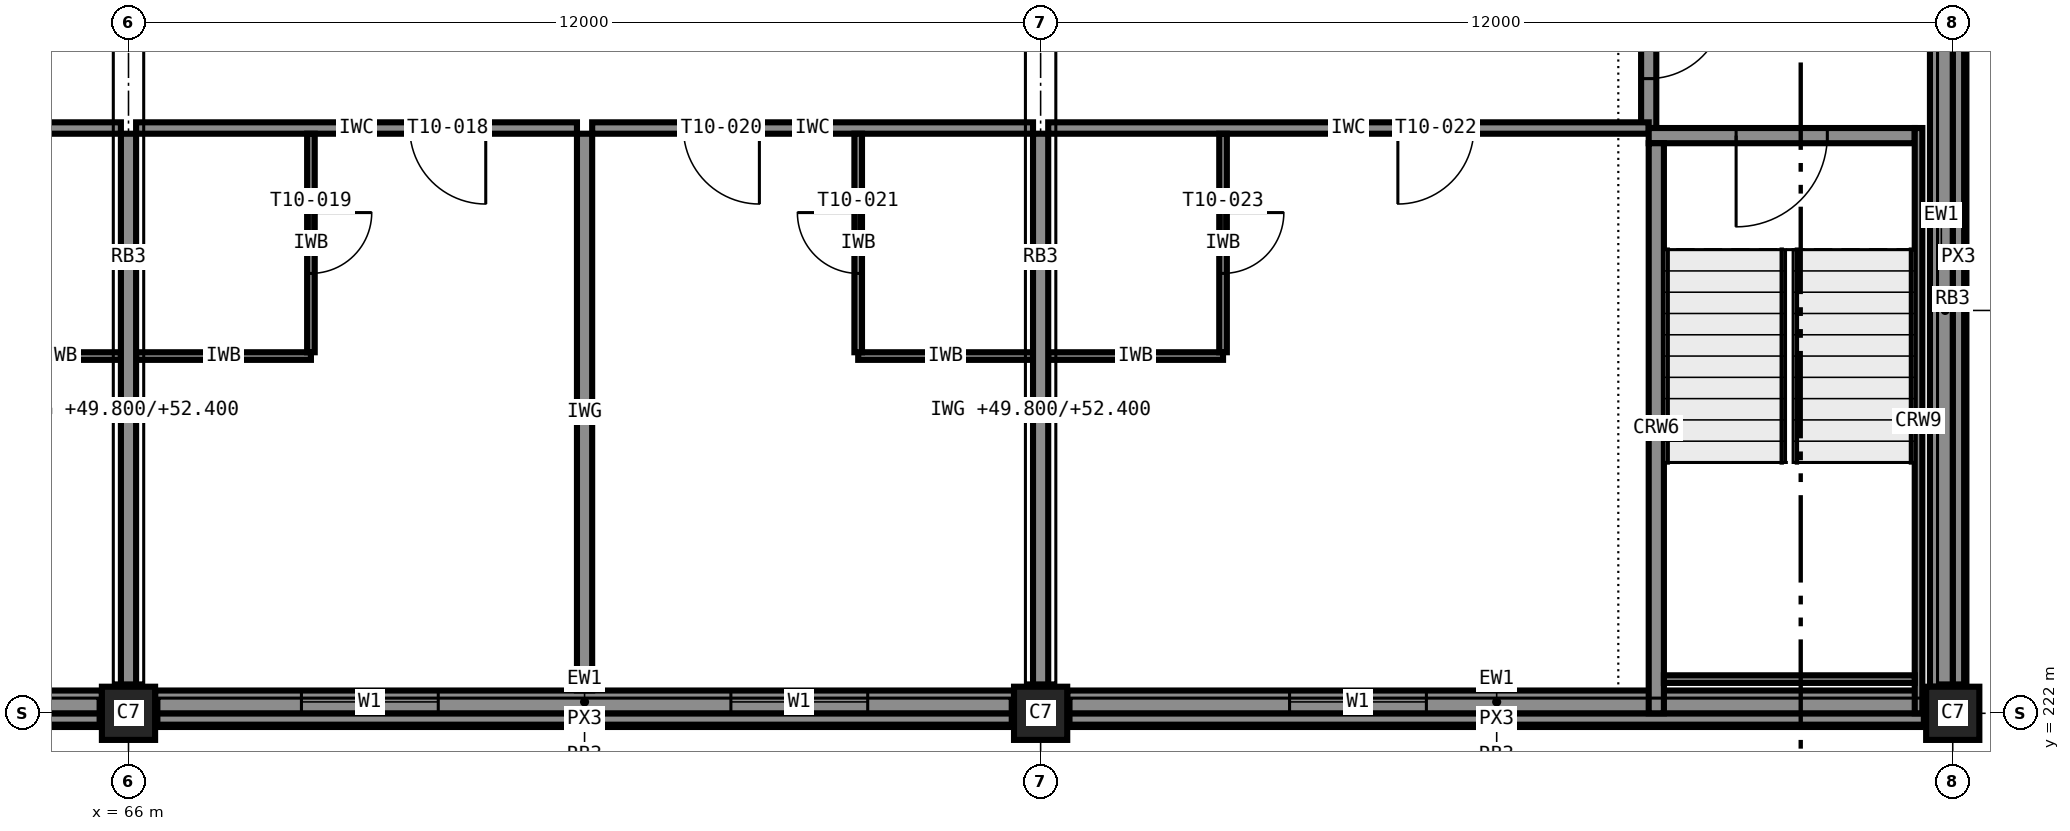
"""IFC4 building model, lengths in metres.
Left out: names, types, materials, properties, quantities, classifications, styles, units other than length and angle.
Written with IfcOpenShell. Run it as: python <this file> out.ifc"""

import sys

from ifc_helpers import new_model, si_unit, direction, frame, frame_2d, origin, origin_2d, place, context, subcontext, project, spatial, rectangle, extrude, element, fill, save


model = new_model("IFC4")
c1 = context("Model", 3, precision=1e-05, world=origin(), true_north=direction((0.0, 1.0)))
c2 = subcontext(c1, "Body", "Model", "MODEL_VIEW")
j1 = project(units=[si_unit("LENGTHUNIT", "METRE"), si_unit("PLANEANGLEUNIT", "RADIAN")], contexts=[c1])
p1 = place(None, origin())
s1 = spatial("IfcSite", under=j1, at=p1, CompositionType="ELEMENT")
p2 = place(p1, origin())
s2 = spatial("IfcBuilding", under=s1, at=p2, CompositionType="ELEMENT")
p3 = place(p2, frame((0.0, 0.0, 49.8)))
s3 = spatial("IfcBuildingStorey", under=s2, at=p3, CompositionType="ELEMENT", Elevation=49.8)
for number, where, z_axis, x_axis in (
    (1, (66.0, 222.0, 0.0), (0.0, 0.0, 1.0), (1.0, 0.0, 0.0)),
    (2, (78.0, 222.0, 0.0), (0.0, 0.0, 1.0), (1.0, 0.0, 0.0)),
    (3, (90.0, 222.0, 0.0), (0.0, 0.0, 1.0), (1.0, 0.0, 0.0)),
):
    element("IfcColumn", number, at=place(p3, frame(where, z_axis=z_axis, x_axis=x_axis)), inside=s3, PredefinedType="COLUMN", context=c2, shape_type="SweptSolid", body=[
        extrude(rectangle(XDim=0.7, YDim=0.7, at=origin_2d()), origin(), (0.0, 0.0, 1.0), 3.6),
    ])
p4 = place(p3, frame((89.5, 229.6, 0.0), z_axis=(0.0, 0.0, 1.0), x_axis=(-1.0, 0.0, 0.0)))
e4 = element("IfcWall", 4, at=p4, inside=s3, PredefinedType="SHEAR", context=c2, shape_type="SweptSolid", body=[
    extrude(rectangle(XDim=3.5, YDim=0.2, at=frame_2d((1.75, 0.0))), origin(), (0.0, 0.0, 1.0), 3.6),
])
p5 = place(p4, frame((1.15, 0.0, 0.0)))
e5 = element("IfcOpeningElement", 5, at=p5, cuts=e4, PredefinedType="OPENING", context=c2, shape_type="SweptSolid", body=[
    extrude(rectangle(XDim=1.2, YDim=2.1, at=frame_2d((0.6, 1.05))), frame((0.0, 0.11, 0.0), z_axis=(0.0, -1.0, 0.0), x_axis=(1.0, 0.0, 0.0)), (0.0, 0.0, 1.0), 0.22),
])
p6 = place(p3, frame((86.1, 222.0, 0.0), z_axis=(0.0, 0.0, 1.0), x_axis=(0.0, 1.0, 0.0)))
e6 = element("IfcWall", 6, at=p6, inside=s3, PredefinedType="SHEAR", context=c2, shape_type="SweptSolid", body=[
    extrude(rectangle(XDim=7.5, YDim=0.2, at=frame_2d((3.75, 0.0))), origin(), (0.0, 0.0, 1.0), 3.6),
])
p7 = place(p3, frame((89.55, 229.7, 0.0), z_axis=(0.0, 0.0, 1.0), x_axis=(0.0, -1.0, 0.0)))
e7 = element("IfcWall", 7, at=p7, inside=s3, PredefinedType="SHEAR", context=c2, shape_type="SweptSolid", body=[
    extrude(rectangle(XDim=7.7, YDim=0.1, at=frame_2d((3.85, 0.0))), origin(), (0.0, 0.0, 1.0), 3.4),
])
p8 = place(p3, frame((89.5, 222.45, 0.0), z_axis=(0.0, 0.0, 1.0), x_axis=(-1.0, 0.0, 0.0)))
e8 = element("IfcWall", 8, at=p8, inside=s3, PredefinedType="SHEAR", context=c2, shape_type="SweptSolid", body=[
    extrude(rectangle(XDim=3.3, YDim=0.1, at=frame_2d((1.65, 0.0))), origin(), (0.0, 0.0, 1.0), 3.4),
])
p9 = place(p3, frame((54.35, 222.15, 0.0), z_axis=(0.0, 0.0, 1.0), x_axis=(1.0, 0.0, 0.0)))
e9 = element("IfcWall", 9, at=p9, inside=s3, PredefinedType="STANDARD", context=c2, shape_type="SweptSolid", body=[
    extrude(rectangle(XDim=11.3, YDim=0.3, at=frame_2d((5.65, 0.0))), origin(), (0.0, 0.0, 1.0), 2.6),
])
p10 = place(p9, frame((0.925, 0.0, 0.85)))
e10 = element("IfcOpeningElement", 10, at=p10, cuts=e9, PredefinedType="OPENING", context=c2, shape_type="SweptSolid", body=[
    extrude(rectangle(XDim=1.8, YDim=1.75, at=frame_2d((0.9, 0.875))), frame((0.0, 0.16, 0.0), z_axis=(0.0, -1.0, 0.0), x_axis=(1.0, 0.0, 0.0)), (0.0, 0.0, 1.0), 0.32),
])
p11 = place(p9, frame((4.75, 0.0, 0.85)))
e11 = element("IfcOpeningElement", 11, at=p11, cuts=e9, PredefinedType="OPENING", context=c2, shape_type="SweptSolid", body=[
    extrude(rectangle(XDim=1.8, YDim=1.75, at=frame_2d((0.9, 0.875))), frame((0.0, 0.16, 0.0), z_axis=(0.0, -1.0, 0.0), x_axis=(1.0, 0.0, 0.0)), (0.0, 0.0, 1.0), 0.32),
])
p12 = place(p9, frame((8.575, 0.0, 0.85)))
e12 = element("IfcOpeningElement", 12, at=p12, cuts=e9, PredefinedType="OPENING", context=c2, shape_type="SweptSolid", body=[
    extrude(rectangle(XDim=1.8, YDim=1.75, at=frame_2d((0.9, 0.875))), frame((0.0, 0.16, 0.0), z_axis=(0.0, -1.0, 0.0), x_axis=(1.0, 0.0, 0.0)), (0.0, 0.0, 1.0), 0.32),
])
p13 = place(p3, frame((66.35, 222.15, 0.0), z_axis=(0.0, 0.0, 1.0), x_axis=(1.0, 0.0, 0.0)))
e13 = element("IfcWall", 13, at=p13, inside=s3, PredefinedType="STANDARD", context=c2, shape_type="SweptSolid", body=[
    extrude(rectangle(XDim=11.3, YDim=0.3, at=frame_2d((5.65, 0.0))), origin(), (0.0, 0.0, 1.0), 2.6),
])
p14 = place(p13, frame((1.925, 0.0, 0.85)))
e14 = element("IfcOpeningElement", 14, at=p14, cuts=e13, PredefinedType="OPENING", context=c2, shape_type="SweptSolid", body=[
    extrude(rectangle(XDim=1.8, YDim=1.75, at=frame_2d((0.9, 0.875))), frame((0.0, 0.16, 0.0), z_axis=(0.0, -1.0, 0.0), x_axis=(1.0, 0.0, 0.0)), (0.0, 0.0, 1.0), 0.32),
])
p15 = place(p13, frame((7.575, 0.0, 0.85)))
e15 = element("IfcOpeningElement", 15, at=p15, cuts=e13, PredefinedType="OPENING", context=c2, shape_type="SweptSolid", body=[
    extrude(rectangle(XDim=1.8, YDim=1.75, at=frame_2d((0.9, 0.875))), frame((0.0, 0.16, 0.0), z_axis=(0.0, -1.0, 0.0), x_axis=(1.0, 0.0, 0.0)), (0.0, 0.0, 1.0), 0.32),
])
p16 = place(p3, frame((78.35, 222.15, 0.0), z_axis=(0.0, 0.0, 1.0), x_axis=(1.0, 0.0, 0.0)))
e16 = element("IfcWall", 16, at=p16, inside=s3, PredefinedType="STANDARD", context=c2, shape_type="SweptSolid", body=[
    extrude(rectangle(XDim=11.3, YDim=0.3, at=frame_2d((5.65, 0.0))), origin(), (0.0, 0.0, 1.0), 2.6),
])
p17 = place(p16, frame((2.925, 0.0, 0.85)))
e17 = element("IfcOpeningElement", 17, at=p17, cuts=e16, PredefinedType="OPENING", context=c2, shape_type="SweptSolid", body=[
    extrude(rectangle(XDim=1.8, YDim=1.75, at=frame_2d((0.9, 0.875))), frame((0.0, 0.16, 0.0), z_axis=(0.0, -1.0, 0.0), x_axis=(1.0, 0.0, 0.0)), (0.0, 0.0, 1.0), 0.32),
])
for number, where, z_axis, x_axis in (
    (18, (54.35, 221.925, 3.4), (0.0, 0.0, 1.0), (1.0, 0.0, 0.0)),
    (19, (66.35, 221.925, 3.4), (0.0, 0.0, 1.0), (1.0, 0.0, 0.0)),
    (20, (78.35, 221.925, 3.4), (0.0, 0.0, 1.0), (1.0, 0.0, 0.0)),
):
    element("IfcWall", number, at=place(p3, frame(where, z_axis=z_axis, x_axis=x_axis)), inside=s3, PredefinedType="STANDARD", context=c2, shape_type="SweptSolid", body=[
        extrude(rectangle(XDim=11.3, YDim=0.15, at=frame_2d((5.65, 0.0))), origin(), (0.0, 0.0, 1.0), 0.2),
    ])
p18 = place(p3, frame((89.85, 222.35, 0.0), z_axis=(0.0, 0.0, 1.0), x_axis=(0.0, 1.0, 0.0)))
e21 = element("IfcWall", 21, at=p18, inside=s3, PredefinedType="STANDARD", context=c2, shape_type="SweptSolid", body=[
    extrude(rectangle(XDim=11.3, YDim=0.3, at=frame_2d((5.65, 0.0))), origin(), (0.0, 0.0, 1.0), 2.6),
])
p19 = place(p3, frame((90.075, 222.35, 3.4), z_axis=(0.0, 0.0, 1.0), x_axis=(0.0, 1.0, 0.0)))
e22 = element("IfcWall", 22, at=p19, inside=s3, PredefinedType="STANDARD", context=c2, shape_type="SweptSolid", body=[
    extrude(rectangle(XDim=11.3, YDim=0.15, at=frame_2d((5.65, 0.0))), origin(), (0.0, 0.0, 1.0), 0.2),
])
p20 = place(p3, frame((86.0, 232.0, 0.0), z_axis=(0.0, 0.0, 1.0), x_axis=(0.0, -1.0, 0.0)))
e23 = element("IfcWall", 23, at=p20, inside=s3, PredefinedType="PARTITIONING", context=c2, shape_type="SweptSolid", body=[
    extrude(rectangle(XDim=2.3, YDim=0.2, at=frame_2d((1.15, 0.0))), origin(), (0.0, 0.0, 1.0), 3.4),
])
p21 = place(p20, frame((0.65, 0.0, 0.0)))
e24 = element("IfcOpeningElement", 24, at=p21, cuts=e23, PredefinedType="OPENING", context=c2, shape_type="SweptSolid", body=[
    extrude(rectangle(XDim=1.0, YDim=2.1, at=frame_2d((0.5, 1.05))), frame((0.0, 0.11, 0.0), z_axis=(0.0, -1.0, 0.0), x_axis=(1.0, 0.0, 0.0)), (0.0, 0.0, 1.0), 0.22),
])
p22 = place(p3, frame((65.9, 229.7, 0.0), z_axis=(0.0, 0.0, 1.0), x_axis=(-1.0, 0.0, 0.0)))
e25 = element("IfcWall", 25, at=p22, inside=s3, PredefinedType="PARTITIONING", context=c2, shape_type="SweptSolid", body=[
    extrude(rectangle(XDim=3.8, YDim=0.15, at=frame_2d((1.9, 0.0))), origin(), (0.0, 0.0, 1.0), 3.4),
])
p23 = place(p22, frame((2.25, 0.0, 0.0)))
e26 = element("IfcOpeningElement", 26, at=p23, cuts=e25, PredefinedType="OPENING", context=c2, shape_type="SweptSolid", body=[
    extrude(rectangle(XDim=1.0, YDim=2.1, at=frame_2d((0.5, 1.05))), frame((0.0, 0.085, 0.0), z_axis=(0.0, -1.0, 0.0), x_axis=(1.0, 0.0, 0.0)), (0.0, 0.0, 1.0), 0.17),
])
p24 = place(p3, frame((64.3, 226.7, 0.0), z_axis=(0.0, 0.0, 1.0), x_axis=(1.0, 0.0, 0.0)))
e27 = element("IfcWall", 27, at=p24, inside=s3, PredefinedType="PARTITIONING", context=c2, shape_type="SweptSolid", body=[
    extrude(rectangle(XDim=1.6, YDim=0.1, at=frame_2d((0.8, 0.0))), origin(), (0.0, 0.0, 1.0), 3.4),
])
p25 = place(p3, frame((71.9, 229.7, 0.0), z_axis=(0.0, 0.0, 1.0), x_axis=(-1.0, 0.0, 0.0)))
e28 = element("IfcWall", 28, at=p25, inside=s3, PredefinedType="PARTITIONING", context=c2, shape_type="SweptSolid", body=[
    extrude(rectangle(XDim=5.8, YDim=0.15, at=frame_2d((2.9, 0.0))), origin(), (0.0, 0.0, 1.0), 3.4),
])
p26 = place(p25, frame((1.2, 0.0, 0.0)))
e29 = element("IfcOpeningElement", 29, at=p26, cuts=e28, PredefinedType="OPENING", context=c2, shape_type="SweptSolid", body=[
    extrude(rectangle(XDim=1.0, YDim=2.1, at=frame_2d((0.5, 1.05))), frame((0.0, 0.085, 0.0), z_axis=(0.0, -1.0, 0.0), x_axis=(1.0, 0.0, 0.0)), (0.0, 0.0, 1.0), 0.17),
])
p27 = place(p3, frame((66.1, 226.7, 0.0), z_axis=(0.0, 0.0, 1.0), x_axis=(1.0, 0.0, 0.0)))
e30 = element("IfcWall", 30, at=p27, inside=s3, PredefinedType="PARTITIONING", context=c2, shape_type="SweptSolid", body=[
    extrude(rectangle(XDim=2.3, YDim=0.1, at=frame_2d((1.15, 0.0))), origin(), (0.0, 0.0, 1.0), 3.4),
])
p28 = place(p3, frame((68.4, 229.625, 0.0), z_axis=(0.0, 0.0, 1.0), x_axis=(0.0, -1.0, 0.0)))
e31 = element("IfcWall", 31, at=p28, inside=s3, PredefinedType="PARTITIONING", context=c2, shape_type="SweptSolid", body=[
    extrude(rectangle(XDim=2.875, YDim=0.1, at=frame_2d((1.438, 0.0))), origin(), (0.0, 0.0, 1.0), 3.4),
])
p29 = place(p28, frame((1.038, 0.0, 0.0)))
e32 = element("IfcOpeningElement", 32, at=p29, cuts=e31, PredefinedType="OPENING", context=c2, shape_type="SweptSolid", body=[
    extrude(rectangle(XDim=0.8, YDim=2.1, at=frame_2d((0.4, 1.05))), frame((0.0, 0.06, 0.0), z_axis=(0.0, -1.0, 0.0), x_axis=(1.0, 0.0, 0.0)), (0.0, 0.0, 1.0), 0.12),
])
p30 = place(p3, frame((77.9, 229.7, 0.0), z_axis=(0.0, 0.0, 1.0), x_axis=(-1.0, 0.0, 0.0)))
e33 = element("IfcWall", 33, at=p30, inside=s3, PredefinedType="PARTITIONING", context=c2, shape_type="SweptSolid", body=[
    extrude(rectangle(XDim=5.8, YDim=0.15, at=frame_2d((2.9, 0.0))), origin(), (0.0, 0.0, 1.0), 3.4),
])
p31 = place(p30, frame((3.6, 0.0, 0.0)))
e34 = element("IfcOpeningElement", 34, at=p31, cuts=e33, PredefinedType="OPENING", context=c2, shape_type="SweptSolid", body=[
    extrude(rectangle(XDim=1.0, YDim=2.1, at=frame_2d((0.5, 1.05))), frame((0.0, 0.085, 0.0), z_axis=(0.0, -1.0, 0.0), x_axis=(1.0, 0.0, 0.0)), (0.0, 0.0, 1.0), 0.17),
])
p32 = place(p3, frame((75.6, 226.7, 0.0), z_axis=(0.0, 0.0, 1.0), x_axis=(1.0, 0.0, 0.0)))
e35 = element("IfcWall", 35, at=p32, inside=s3, PredefinedType="PARTITIONING", context=c2, shape_type="SweptSolid", body=[
    extrude(rectangle(XDim=2.3, YDim=0.1, at=frame_2d((1.15, 0.0))), origin(), (0.0, 0.0, 1.0), 3.4),
])
p33 = place(p3, frame((75.6, 226.75, 0.0), z_axis=(0.0, 0.0, 1.0), x_axis=(0.0, 1.0, 0.0)))
e36 = element("IfcWall", 36, at=p33, inside=s3, PredefinedType="PARTITIONING", context=c2, shape_type="SweptSolid", body=[
    extrude(rectangle(XDim=2.875, YDim=0.1, at=frame_2d((1.438, 0.0))), origin(), (0.0, 0.0, 1.0), 3.4),
])
p34 = place(p33, frame((1.038, 0.0, 0.0)))
e37 = element("IfcOpeningElement", 37, at=p34, cuts=e36, PredefinedType="OPENING", context=c2, shape_type="SweptSolid", body=[
    extrude(rectangle(XDim=0.8, YDim=2.1, at=frame_2d((0.4, 1.05))), frame((0.0, 0.06, 0.0), z_axis=(0.0, -1.0, 0.0), x_axis=(1.0, 0.0, 0.0)), (0.0, 0.0, 1.0), 0.12),
])
p35 = place(p3, frame((86.0, 229.7, 0.0), z_axis=(0.0, 0.0, 1.0), x_axis=(-1.0, 0.0, 0.0)))
e38 = element("IfcWall", 38, at=p35, inside=s3, PredefinedType="PARTITIONING", context=c2, shape_type="SweptSolid", body=[
    extrude(rectangle(XDim=7.9, YDim=0.15, at=frame_2d((3.95, 0.0))), origin(), (0.0, 0.0, 1.0), 3.4),
])
p36 = place(p35, frame((2.3, 0.0, 0.0)))
e39 = element("IfcOpeningElement", 39, at=p36, cuts=e38, PredefinedType="OPENING", context=c2, shape_type="SweptSolid", body=[
    extrude(rectangle(XDim=1.0, YDim=2.1, at=frame_2d((0.5, 1.05))), frame((0.0, 0.085, 0.0), z_axis=(0.0, -1.0, 0.0), x_axis=(1.0, 0.0, 0.0)), (0.0, 0.0, 1.0), 0.17),
])
p37 = place(p3, frame((78.1, 226.7, 0.0), z_axis=(0.0, 0.0, 1.0), x_axis=(1.0, 0.0, 0.0)))
e40 = element("IfcWall", 40, at=p37, inside=s3, PredefinedType="PARTITIONING", context=c2, shape_type="SweptSolid", body=[
    extrude(rectangle(XDim=2.3, YDim=0.1, at=frame_2d((1.15, 0.0))), origin(), (0.0, 0.0, 1.0), 3.4),
])
p38 = place(p3, frame((80.4, 229.625, 0.0), z_axis=(0.0, 0.0, 1.0), x_axis=(0.0, -1.0, 0.0)))
e41 = element("IfcWall", 41, at=p38, inside=s3, PredefinedType="PARTITIONING", context=c2, shape_type="SweptSolid", body=[
    extrude(rectangle(XDim=2.875, YDim=0.1, at=frame_2d((1.438, 0.0))), origin(), (0.0, 0.0, 1.0), 3.4),
])
p39 = place(p38, frame((1.038, 0.0, 0.0)))
e42 = element("IfcOpeningElement", 42, at=p39, cuts=e41, PredefinedType="OPENING", context=c2, shape_type="SweptSolid", body=[
    extrude(rectangle(XDim=0.8, YDim=2.1, at=frame_2d((0.4, 1.05))), frame((0.0, 0.06, 0.0), z_axis=(0.0, -1.0, 0.0), x_axis=(1.0, 0.0, 0.0)), (0.0, 0.0, 1.0), 0.12),
])
p40 = place(p3, frame((66.0, 222.35, 0.0), z_axis=(0.0, 0.0, 1.0), x_axis=(0.0, 1.0, 0.0)))
e43 = element("IfcWall", 43, at=p40, inside=s3, PredefinedType="PARTITIONING", context=c2, shape_type="SweptSolid", body=[
    extrude(rectangle(XDim=7.275, YDim=0.2, at=frame_2d((3.637, 0.0))), origin(), (0.0, 0.0, 1.0), 2.6),
])
p41 = place(p3, frame((72.0, 222.3, 0.0), z_axis=(0.0, 0.0, 1.0), x_axis=(0.0, 1.0, 0.0)))
e44 = element("IfcWall", 44, at=p41, inside=s3, PredefinedType="PARTITIONING", context=c2, shape_type="SweptSolid", body=[
    extrude(rectangle(XDim=7.325, YDim=0.2, at=frame_2d((3.663, 0.0))), origin(), (0.0, 0.0, 1.0), 3.4),
])
p42 = place(p3, frame((78.0, 222.35, 0.0), z_axis=(0.0, 0.0, 1.0), x_axis=(0.0, 1.0, 0.0)))
e45 = element("IfcWall", 45, at=p42, inside=s3, PredefinedType="PARTITIONING", context=c2, shape_type="SweptSolid", body=[
    extrude(rectangle(XDim=7.275, YDim=0.2, at=frame_2d((3.637, 0.0))), origin(), (0.0, 0.0, 1.0), 2.6),
])
p43 = place(p14, origin())
e46 = element("IfcWindow", 46, at=p43, inside=s3, PartitioningType="SINGLE_PANEL", PredefinedType="WINDOW", context=c2, shape_type="SweptSolid", body=[
    extrude(rectangle(XDim=1.8, YDim=1.75, at=frame_2d((0.9, 0.875))), frame((0.0, 0.03, 0.0), z_axis=(0.0, -1.0, 0.0), x_axis=(1.0, 0.0, 0.0)), (0.0, 0.0, 1.0), 0.06),
])
fill(e14, e46)
p44 = place(p15, origin())
e47 = element("IfcWindow", 47, at=p44, inside=s3, PartitioningType="SINGLE_PANEL", PredefinedType="WINDOW", context=c2, shape_type="SweptSolid", body=[
    extrude(rectangle(XDim=1.8, YDim=1.75, at=frame_2d((0.9, 0.875))), frame((0.0, 0.03, 0.0), z_axis=(0.0, -1.0, 0.0), x_axis=(1.0, 0.0, 0.0)), (0.0, 0.0, 1.0), 0.06),
])
fill(e15, e47)
p45 = place(p17, origin())
e48 = element("IfcWindow", 48, at=p45, inside=s3, PartitioningType="SINGLE_PANEL", PredefinedType="WINDOW", context=c2, shape_type="SweptSolid", body=[
    extrude(rectangle(XDim=1.8, YDim=1.75, at=frame_2d((0.9, 0.875))), frame((0.0, 0.03, 0.0), z_axis=(0.0, -1.0, 0.0), x_axis=(1.0, 0.0, 0.0)), (0.0, 0.0, 1.0), 0.06),
])
fill(e17, e48)
p46 = place(p21, origin())
e49 = element("IfcDoor", 49, at=p46, inside=s3, OperationType="SINGLE_SWING_LEFT", PredefinedType="DOOR", context=c2, shape_type="SweptSolid", body=[
    extrude(rectangle(XDim=1.0, YDim=2.1, at=frame_2d((0.5, 1.05))), frame((0.0, 0.025, 0.0), z_axis=(0.0, -1.0, 0.0), x_axis=(1.0, 0.0, 0.0)), (0.0, 0.0, 1.0), 0.05),
])
fill(e24, e49)
p47 = place(p26, origin())
e50 = element("IfcDoor", 50, at=p47, inside=s3, OperationType="SINGLE_SWING_LEFT", PredefinedType="DOOR", context=c2, shape_type="SweptSolid", body=[
    extrude(rectangle(XDim=1.0, YDim=2.1, at=frame_2d((0.5, 1.05))), frame((0.0, 0.025, 0.0), z_axis=(0.0, -1.0, 0.0), x_axis=(1.0, 0.0, 0.0)), (0.0, 0.0, 1.0), 0.05),
])
fill(e29, e50)
p48 = place(p29, origin())
e51 = element("IfcDoor", 51, at=p48, inside=s3, OperationType="SINGLE_SWING_LEFT", PredefinedType="DOOR", context=c2, shape_type="SweptSolid", body=[
    extrude(rectangle(XDim=0.8, YDim=2.1, at=frame_2d((0.4, 1.05))), frame((0.0, 0.025, 0.0), z_axis=(0.0, -1.0, 0.0), x_axis=(1.0, 0.0, 0.0)), (0.0, 0.0, 1.0), 0.05),
])
fill(e32, e51)
p49 = place(p31, origin())
e52 = element("IfcDoor", 52, at=p49, inside=s3, OperationType="SINGLE_SWING_LEFT", PredefinedType="DOOR", context=c2, shape_type="SweptSolid", body=[
    extrude(rectangle(XDim=1.0, YDim=2.1, at=frame_2d((0.5, 1.05))), frame((0.0, 0.025, 0.0), z_axis=(0.0, -1.0, 0.0), x_axis=(1.0, 0.0, 0.0)), (0.0, 0.0, 1.0), 0.05),
])
fill(e34, e52)
p50 = place(p34, origin())
e53 = element("IfcDoor", 53, at=p50, inside=s3, OperationType="SINGLE_SWING_RIGHT", PredefinedType="DOOR", context=c2, shape_type="SweptSolid", body=[
    extrude(rectangle(XDim=0.8, YDim=2.1, at=frame_2d((0.4, 1.05))), frame((0.0, 0.025, 0.0), z_axis=(0.0, -1.0, 0.0), x_axis=(1.0, 0.0, 0.0)), (0.0, 0.0, 1.0), 0.05),
])
fill(e37, e53)
p51 = place(p36, origin())
e54 = element("IfcDoor", 54, at=p51, inside=s3, OperationType="SINGLE_SWING_RIGHT", PredefinedType="DOOR", context=c2, shape_type="SweptSolid", body=[
    extrude(rectangle(XDim=1.0, YDim=2.1, at=frame_2d((0.5, 1.05))), frame((0.0, 0.025, 0.0), z_axis=(0.0, -1.0, 0.0), x_axis=(1.0, 0.0, 0.0)), (0.0, 0.0, 1.0), 0.05),
])
fill(e39, e54)
p52 = place(p39, origin())
e55 = element("IfcDoor", 55, at=p52, inside=s3, OperationType="SINGLE_SWING_LEFT", PredefinedType="DOOR", context=c2, shape_type="SweptSolid", body=[
    extrude(rectangle(XDim=0.8, YDim=2.1, at=frame_2d((0.4, 1.05))), frame((0.0, 0.025, 0.0), z_axis=(0.0, -1.0, 0.0), x_axis=(1.0, 0.0, 0.0)), (0.0, 0.0, 1.0), 0.05),
])
fill(e42, e55)
p53 = place(p5, origin())
e56 = element("IfcDoor", 56, at=p53, inside=s3, OperationType="SINGLE_SWING_RIGHT", PredefinedType="DOOR", context=c2, shape_type="SweptSolid", body=[
    extrude(rectangle(XDim=1.2, YDim=2.1, at=frame_2d((0.6, 1.05))), frame((0.0, 0.025, 0.0), z_axis=(0.0, -1.0, 0.0), x_axis=(1.0, 0.0, 0.0)), (0.0, 0.0, 1.0), 0.05),
])
fill(e5, e56)
save(model, sys.argv[1])
